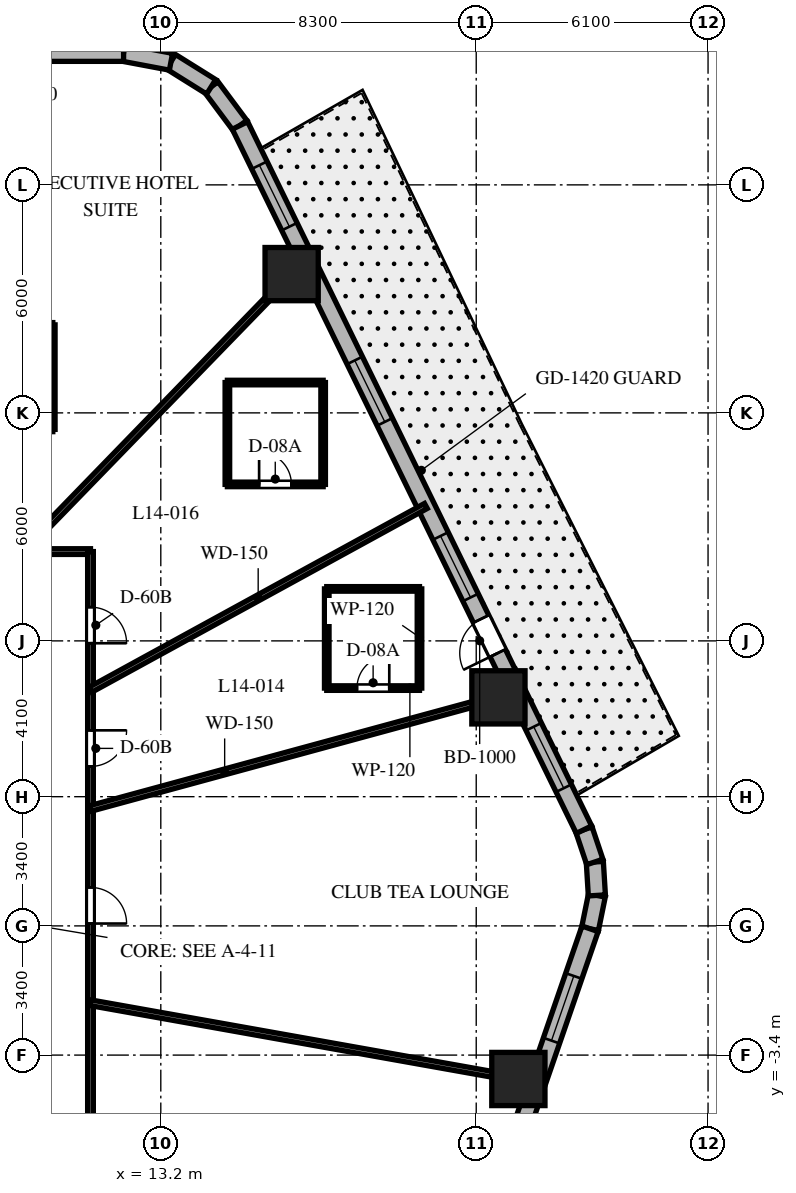
"""IFC4 building model, lengths in metres.
Left out: names, types, materials, properties, quantities, classifications, styles, units other than length and angle.
Written with IfcOpenShell. Run it as: python <this file> out.ifc"""

import sys

from ifc_helpers import new_model, si_unit, direction, frame, frame_2d, origin, origin_2d, place, context, subcontext, project, spatial, rectangle, extrude, element, fill, save


model = new_model("IFC4")
c1 = context("Model", 3, precision=1e-05, world=origin(), true_north=direction((0.0, 1.0)))
c2 = subcontext(c1, "Body", "Model", "MODEL_VIEW")
j1 = project(units=[si_unit("LENGTHUNIT", "METRE"), si_unit("PLANEANGLEUNIT", "RADIAN")], contexts=[c1])
p1 = place(None, origin())
s1 = spatial("IfcSite", under=j1, at=p1, CompositionType="ELEMENT")
p2 = place(p1, origin())
s2 = spatial("IfcBuilding", under=s1, at=p2, CompositionType="ELEMENT")
p3 = place(p2, frame((0.0, 0.0, 63.8)))
s3 = spatial("IfcBuildingStorey", under=s2, at=p3, CompositionType="ELEMENT", Elevation=63.8)
for number, where, z_axis, x_axis in (
    (1, (22.609, -4.029, 0.0), (0.0, 0.0, 1.0), (1.0, 0.0, 0.0)),
    (2, (22.084, 6.014, 0.0), (0.0, 0.0, 1.0), (1.0, 0.0, 0.0)),
    (3, (16.643, 17.152, 0.0), (0.0, 0.0, 1.0), (1.0, 0.0, 0.0)),
):
    element("IfcColumn", number, at=place(p3, frame(where, z_axis=z_axis, x_axis=x_axis)), inside=s3, PredefinedType="COLUMN", context=c2, shape_type="SweptSolid", body=[
        extrude(rectangle(XDim=1.4, YDim=1.4, at=origin_2d()), origin(), (0.0, 0.0, 1.0), 3.7),
    ])
p4 = place(p3, frame((24.496, -0.077, 0.0), z_axis=(0.0, 0.0, 1.0), x_axis=(0.199570594521, 0.979883451132, 0.0)))
e4 = element("IfcWall", 4, at=p4, inside=s3, PredefinedType="SOLIDWALL", context=c2, shape_type="SweptSolid", body=[
    extrude(rectangle(XDim=0.897, YDim=0.45, at=frame_2d((0.448, 0.0))), origin(), (0.0, 0.0, 1.0), 3.4),
])
p5 = place(p3, frame((24.675, 0.802, 0.0), z_axis=(0.0, 0.0, 1.0), x_axis=(-0.061188874166, 0.998126205286, 0.0)))
e5 = element("IfcWall", 5, at=p5, inside=s3, PredefinedType="SOLIDWALL", context=c2, shape_type="SweptSolid", body=[
    extrude(rectangle(XDim=0.882, YDim=0.45, at=frame_2d((0.441, 0.0))), origin(), (0.0, 0.0, 1.0), 3.4),
])
p6 = place(p3, frame((24.621, 1.682, 0.0), z_axis=(0.0, 0.0, 1.0), x_axis=(-0.317697451681, 0.948192137278, 0.0)))
e6 = element("IfcWall", 6, at=p6, inside=s3, PredefinedType="SOLIDWALL", context=c2, shape_type="SweptSolid", body=[
    extrude(rectangle(XDim=0.897, YDim=0.45, at=frame_2d((0.448, 0.0))), origin(), (0.0, 0.0, 1.0), 3.4),
])
p7 = place(p3, frame((15.284, 21.062, 0.0), z_axis=(0.0, 0.0, 1.0), x_axis=(-0.597595366449, 0.801797841104, 0.0)))
e7 = element("IfcWall", 7, at=p7, inside=s3, PredefinedType="SOLIDWALL", context=c2, shape_type="SweptSolid", body=[
    extrude(rectangle(XDim=1.269, YDim=0.45, at=frame_2d((0.634, 0.0))), origin(), (0.0, 0.0, 1.0), 3.4),
])
p8 = place(p3, frame((14.526, 22.08, 0.0), z_axis=(0.0, 0.0, 1.0), x_axis=(-0.848185203596, 0.529699783275, 0.0)))
e8 = element("IfcWall", 8, at=p8, inside=s3, PredefinedType="SOLIDWALL", context=c2, shape_type="SweptSolid", body=[
    extrude(rectangle(XDim=1.247, YDim=0.45, at=frame_2d((0.624, 0.0))), origin(), (0.0, 0.0, 1.0), 3.4),
])
p9 = place(p3, frame((13.468, 22.74, 0.0), z_axis=(0.0, 0.0, 1.0), x_axis=(-0.982717174228, 0.185113358451, 0.0)))
e9 = element("IfcWall", 9, at=p9, inside=s3, PredefinedType="SOLIDWALL", context=c2, shape_type="SweptSolid", body=[
    extrude(rectangle(XDim=1.269, YDim=0.45, at=frame_2d((0.634, 0.0))), origin(), (0.0, 0.0, 1.0), 3.4),
])
p10 = place(p3, frame((17.39, -20.678, 0.0), z_axis=(0.0, 0.0, 1.0), x_axis=(0.326068018294, 0.945346310854, 0.0)))
e10 = element("IfcWall", 10, at=p10, inside=s3, PredefinedType="SOLIDWALL", context=c2, shape_type="SweptSolid", body=[
    extrude(rectangle(XDim=21.793, YDim=0.45, at=frame_2d((10.896, 0.0))), origin(), (0.0, 0.0, 1.0), 3.4),
])
p11 = place(p10, frame((1.26, 0.0, 0.8)))
e11 = element("IfcOpeningElement", 11, at=p11, cuts=e10, PredefinedType="OPENING", context=c2, shape_type="SweptSolid", body=[
    extrude(rectangle(XDim=1.8, YDim=1.8, at=frame_2d((0.9, 0.9))), frame((0.0, 0.235, 0.0), z_axis=(0.0, -1.0, 0.0), x_axis=(1.0, 0.0, 0.0)), (0.0, 0.0, 1.0), 0.47),
])
p12 = place(p10, frame((9.943, 0.0, 0.8)))
e12 = element("IfcOpeningElement", 12, at=p12, cuts=e10, PredefinedType="OPENING", context=c2, shape_type="SweptSolid", body=[
    extrude(rectangle(XDim=1.8, YDim=1.8, at=frame_2d((0.9, 0.9))), frame((0.0, 0.235, 0.0), z_axis=(0.0, -1.0, 0.0), x_axis=(1.0, 0.0, 0.0)), (0.0, 0.0, 1.0), 0.47),
])
p13 = place(p10, frame((18.68, 0.0, 0.8)))
e13 = element("IfcOpeningElement", 13, at=p13, cuts=e10, PredefinedType="OPENING", context=c2, shape_type="SweptSolid", body=[
    extrude(rectangle(XDim=1.8, YDim=1.8, at=frame_2d((0.9, 0.9))), frame((0.0, 0.235, 0.0), z_axis=(0.0, -1.0, 0.0), x_axis=(1.0, 0.0, 0.0)), (0.0, 0.0, 1.0), 0.47),
])
p14 = place(p3, frame((24.336, 2.532, 0.0), z_axis=(0.0, 0.0, 1.0), x_axis=(-0.438931326393, 0.898520612291, 0.0)))
e14 = element("IfcWall", 14, at=p14, inside=s3, PredefinedType="SOLIDWALL", context=c2, shape_type="SweptSolid", body=[
    extrude(rectangle(XDim=20.623, YDim=0.45, at=frame_2d((10.312, 0.0))), origin(), (0.0, 0.0, 1.0), 3.4),
])
p15 = place(p14, frame((5.171, 0.0, 0.0)))
e15 = element("IfcOpeningElement", 15, at=p15, cuts=e14, PredefinedType="OPENING", context=c2, shape_type="SweptSolid", body=[
    extrude(rectangle(XDim=1.0, YDim=2.15, at=frame_2d((0.5, 1.075))), frame((0.0, 0.235, 0.0), z_axis=(0.0, -1.0, 0.0), x_axis=(1.0, 0.0, 0.0)), (0.0, 0.0, 1.0), 0.47),
])
p16 = place(p14, frame((6.8, 0.0, 0.8)))
e16 = element("IfcOpeningElement", 16, at=p16, cuts=e14, PredefinedType="OPENING", context=c2, shape_type="SweptSolid", body=[
    extrude(rectangle(XDim=1.8, YDim=1.8, at=frame_2d((0.9, 0.9))), frame((0.0, 0.235, 0.0), z_axis=(0.0, -1.0, 0.0), x_axis=(1.0, 0.0, 0.0)), (0.0, 0.0, 1.0), 0.47),
])
p17 = place(p14, frame((11.942, 0.0, 0.8)))
e17 = element("IfcOpeningElement", 17, at=p17, cuts=e14, PredefinedType="OPENING", context=c2, shape_type="SweptSolid", body=[
    extrude(rectangle(XDim=1.8, YDim=1.8, at=frame_2d((0.9, 0.9))), frame((0.0, 0.235, 0.0), z_axis=(0.0, -1.0, 0.0), x_axis=(1.0, 0.0, 0.0)), (0.0, 0.0, 1.0), 0.47),
])
p18 = place(p14, frame((17.66, 0.0, 0.8)))
e18 = element("IfcOpeningElement", 18, at=p18, cuts=e14, PredefinedType="OPENING", context=c2, shape_type="SweptSolid", body=[
    extrude(rectangle(XDim=1.8, YDim=1.8, at=frame_2d((0.9, 0.9))), frame((0.0, 0.235, 0.0), z_axis=(0.0, -1.0, 0.0), x_axis=(1.0, 0.0, 0.0)), (0.0, 0.0, 1.0), 0.47),
])
p19 = place(p14, frame((1.214, 0.0, 0.8)))
e19 = element("IfcOpeningElement", 19, at=p19, cuts=e14, PredefinedType="OPENING", context=c2, shape_type="SweptSolid", body=[
    extrude(rectangle(XDim=1.8, YDim=1.8, at=frame_2d((0.9, 0.9))), frame((0.0, 0.235, 0.0), z_axis=(0.0, -1.0, 0.0), x_axis=(1.0, 0.0, 0.0)), (0.0, 0.0, 1.0), 0.47),
])
p20 = place(p3, frame((12.221, 22.975, 0.0), z_axis=(0.0, 0.0, 1.0), x_axis=(-1.0, 0.0, 0.0)))
e20 = element("IfcWall", 20, at=p20, inside=s3, PredefinedType="SOLIDWALL", context=c2, shape_type="SweptSolid", body=[
    extrude(rectangle(XDim=26.389, YDim=0.45, at=frame_2d((13.195, 0.0))), origin(), (0.0, 0.0, 1.0), 3.4),
])
p21 = place(p20, frame((2.799, 0.0, 0.0)))
e21 = element("IfcOpeningElement", 21, at=p21, cuts=e20, PredefinedType="OPENING", context=c2, shape_type="SweptSolid", body=[
    extrude(rectangle(XDim=0.95, YDim=2.15, at=frame_2d((0.475, 1.075))), frame((0.0, 0.235, 0.0), z_axis=(0.0, -1.0, 0.0), x_axis=(1.0, 0.0, 0.0)), (0.0, 0.0, 1.0), 0.47),
])
p22 = place(p20, frame((12.296, 0.0, 0.8)))
e22 = element("IfcOpeningElement", 22, at=p22, cuts=e20, PredefinedType="OPENING", context=c2, shape_type="SweptSolid", body=[
    extrude(rectangle(XDim=1.8, YDim=1.8, at=frame_2d((0.9, 0.9))), frame((0.0, 0.235, 0.0), z_axis=(0.0, -1.0, 0.0), x_axis=(1.0, 0.0, 0.0)), (0.0, 0.0, 1.0), 0.47),
])
p23 = place(p20, frame((22.938, 0.0, 0.8)))
e23 = element("IfcOpeningElement", 23, at=p23, cuts=e20, PredefinedType="OPENING", context=c2, shape_type="SweptSolid", body=[
    extrude(rectangle(XDim=1.8, YDim=1.8, at=frame_2d((0.9, 0.9))), frame((0.0, 0.235, 0.0), z_axis=(0.0, -1.0, 0.0), x_axis=(1.0, 0.0, 0.0)), (0.0, 0.0, 1.0), 0.47),
])
p24 = place(p3, frame((-11.35, 9.85, 0.0), z_axis=(0.0, 0.0, 1.0), x_axis=(1.0, 0.0, 0.0)))
e24 = element("IfcWall", 24, at=p24, inside=s3, PredefinedType="PARTITIONING", context=c2, shape_type="SweptSolid", body=[
    extrude(rectangle(XDim=22.7, YDim=0.15, at=frame_2d((11.35, 0.0))), origin(), (0.0, 0.0, 1.0), 2.84),
])
p25 = place(p24, frame((17.225, 0.0, 0.0)))
e25 = element("IfcOpeningElement", 25, at=p25, cuts=e24, PredefinedType="OPENING", context=c2, shape_type="SweptSolid", body=[
    extrude(rectangle(XDim=0.95, YDim=2.03, at=frame_2d((0.475, 1.015))), frame((0.0, 0.085, 0.0), z_axis=(0.0, -1.0, 0.0), x_axis=(1.0, 0.0, 0.0)), (0.0, 0.0, 1.0), 0.17),
])
p26 = place(p24, frame((10.444, 0.0, 0.0)))
e26 = element("IfcOpeningElement", 26, at=p26, cuts=e24, PredefinedType="OPENING", context=c2, shape_type="SweptSolid", body=[
    extrude(rectangle(XDim=0.95, YDim=2.03, at=frame_2d((0.475, 1.015))), frame((0.0, 0.085, 0.0), z_axis=(0.0, -1.0, 0.0), x_axis=(1.0, 0.0, 0.0)), (0.0, 0.0, 1.0), 0.17),
])
p27 = place(p24, frame((3.369, 0.0, 0.0)))
e27 = element("IfcOpeningElement", 27, at=p27, cuts=e24, PredefinedType="OPENING", context=c2, shape_type="SweptSolid", body=[
    extrude(rectangle(XDim=0.95, YDim=2.03, at=frame_2d((0.475, 1.015))), frame((0.0, 0.085, 0.0), z_axis=(0.0, -1.0, 0.0), x_axis=(1.0, 0.0, 0.0)), (0.0, 0.0, 1.0), 0.17),
])
p28 = place(p3, frame((11.35, 9.85, 0.0), z_axis=(0.0, 0.0, 1.0), x_axis=(0.0, -1.0, 0.0)))
e28 = element("IfcWall", 28, at=p28, inside=s3, PredefinedType="PARTITIONING", context=c2, shape_type="SweptSolid", body=[
    extrude(rectangle(XDim=19.7, YDim=0.15, at=frame_2d((9.85, 0.0))), origin(), (0.0, 0.0, 1.0), 2.84),
])
p29 = place(p28, frame((4.704, 0.0, 0.0)))
e29 = element("IfcOpeningElement", 29, at=p29, cuts=e28, PredefinedType="OPENING", context=c2, shape_type="SweptSolid", body=[
    extrude(rectangle(XDim=0.95, YDim=2.03, at=frame_2d((0.475, 1.015))), frame((0.0, 0.085, 0.0), z_axis=(0.0, -1.0, 0.0), x_axis=(1.0, 0.0, 0.0)), (0.0, 0.0, 1.0), 0.17),
])
p30 = place(p28, frame((1.462, 0.0, 0.0)))
e30 = element("IfcOpeningElement", 30, at=p30, cuts=e28, PredefinedType="OPENING", context=c2, shape_type="SweptSolid", body=[
    extrude(rectangle(XDim=0.95, YDim=2.03, at=frame_2d((0.475, 1.015))), frame((0.0, 0.085, 0.0), z_axis=(0.0, -1.0, 0.0), x_axis=(1.0, 0.0, 0.0)), (0.0, 0.0, 1.0), 0.17),
])
p31 = place(p28, frame((15.191, 0.0, 0.0)))
e31 = element("IfcOpeningElement", 31, at=p31, cuts=e28, PredefinedType="OPENING", context=c2, shape_type="SweptSolid", body=[
    extrude(rectangle(XDim=0.95, YDim=2.03, at=frame_2d((0.475, 1.015))), frame((0.0, 0.085, 0.0), z_axis=(0.0, -1.0, 0.0), x_axis=(1.0, 0.0, 0.0)), (0.0, 0.0, 1.0), 0.17),
])
p32 = place(p28, frame((8.838, 0.0, 0.0)))
e32 = element("IfcOpeningElement", 32, at=p32, cuts=e28, PredefinedType="OPENING", context=c2, shape_type="SweptSolid", body=[
    extrude(rectangle(XDim=0.95, YDim=2.03, at=frame_2d((0.475, 1.015))), frame((0.0, 0.085, 0.0), z_axis=(0.0, -1.0, 0.0), x_axis=(1.0, 0.0, 0.0)), (0.0, 0.0, 1.0), 0.17),
])
p33 = place(p3, frame((11.35, 3.091, 0.0), z_axis=(0.0, 0.0, 1.0), x_axis=(0.964859685283, 0.262765651704, 0.0)))
e33 = element("IfcWall", 33, at=p33, inside=s3, PredefinedType="PARTITIONING", context=c2, shape_type="SweptSolid", body=[
    extrude(rectangle(XDim=11.629, YDim=0.15, at=frame_2d((5.814, 0.0))), origin(), (0.0, 0.0, 1.0), 2.54),
])
p34 = place(p3, frame((11.35, 6.217, 0.0), z_axis=(0.0, 0.0, 1.0), x_axis=(0.877047587135, 0.480403507378, 0.0)))
e34 = element("IfcWall", 34, at=p34, inside=s3, PredefinedType="PARTITIONING", context=c2, shape_type="SweptSolid", body=[
    extrude(rectangle(XDim=10.062, YDim=0.15, at=frame_2d((5.031, 0.0))), origin(), (0.0, 0.0, 1.0), 2.54),
])
p35 = place(p3, frame((9.558, 9.85, 0.0), z_axis=(0.0, 0.0, 1.0), x_axis=(0.69638346089, 0.717669893056, 0.0)))
e35 = element("IfcWall", 35, at=p35, inside=s3, PredefinedType="PARTITIONING", context=c2, shape_type="SweptSolid", body=[
    extrude(rectangle(XDim=10.701, YDim=0.15, at=frame_2d((5.351, 0.0))), origin(), (0.0, 0.0, 1.0), 2.54),
])
p36 = place(p3, frame((11.35, -2.023, 0.0), z_axis=(0.0, 0.0, 1.0), x_axis=(0.984493741877, -0.17541970301, 0.0)))
e36 = element("IfcWall", 36, at=p36, inside=s3, PredefinedType="PARTITIONING", context=c2, shape_type="SweptSolid", body=[
    extrude(rectangle(XDim=11.937, YDim=0.15, at=frame_2d((5.969, 0.0))), origin(), (0.0, 0.0, 1.0), 2.54),
])
p37 = place(p3, frame((17.567, 6.258, 0.0), z_axis=(0.0, 0.0, 1.0), x_axis=(1.0, 0.0, 0.0)))
e37 = element("IfcWall", 37, at=p37, inside=s3, PredefinedType="PARTITIONING", context=c2, shape_type="SweptSolid", body=[
    extrude(rectangle(XDim=2.44, YDim=0.12, at=frame_2d((1.22, 0.0))), origin(), (0.0, 0.0, 1.0), 2.84),
])
p38 = place(p37, frame((0.795, 0.0, 0.0)))
e38 = element("IfcOpeningElement", 38, at=p38, cuts=e37, PredefinedType="OPENING", context=c2, shape_type="SweptSolid", body=[
    extrude(rectangle(XDim=0.85, YDim=2.03, at=frame_2d((0.425, 1.015))), frame((0.0, 0.07, 0.0), z_axis=(0.0, -1.0, 0.0), x_axis=(1.0, 0.0, 0.0)), (0.0, 0.0, 1.0), 0.14),
])
p39 = place(p3, frame((20.007, 6.258, 0.0), z_axis=(0.0, 0.0, 1.0), x_axis=(0.0, 1.0, 0.0)))
e39 = element("IfcWall", 39, at=p39, inside=s3, PredefinedType="PARTITIONING", context=c2, shape_type="SweptSolid", body=[
    extrude(rectangle(XDim=2.61, YDim=0.12, at=frame_2d((1.305, 0.0))), origin(), (0.0, 0.0, 1.0), 2.84),
])
p40 = place(p3, frame((20.007, 8.868, 0.0), z_axis=(0.0, 0.0, 1.0), x_axis=(-1.0, 0.0, 0.0)))
e40 = element("IfcWall", 40, at=p40, inside=s3, PredefinedType="PARTITIONING", context=c2, shape_type="SweptSolid", body=[
    extrude(rectangle(XDim=2.44, YDim=0.12, at=frame_2d((1.22, 0.0))), origin(), (0.0, 0.0, 1.0), 3.4),
])
p41 = place(p3, frame((17.567, 8.868, 0.0), z_axis=(0.0, 0.0, 1.0), x_axis=(0.0, -1.0, 0.0)))
e41 = element("IfcWall", 41, at=p41, inside=s3, PredefinedType="PARTITIONING", context=c2, shape_type="SweptSolid", body=[
    extrude(rectangle(XDim=2.61, YDim=0.12, at=frame_2d((1.305, 0.0))), origin(), (0.0, 0.0, 1.0), 2.84),
])
p42 = place(p3, frame((14.952, 11.618, 0.0), z_axis=(0.0, 0.0, 1.0), x_axis=(1.0, 0.0, 0.0)))
e42 = element("IfcWall", 42, at=p42, inside=s3, PredefinedType="PARTITIONING", context=c2, shape_type="SweptSolid", body=[
    extrude(rectangle(XDim=2.52, YDim=0.12, at=frame_2d((1.26, 0.0))), origin(), (0.0, 0.0, 1.0), 2.927),
])
p43 = place(p42, frame((0.835, 0.0, 0.0)))
e43 = element("IfcOpeningElement", 43, at=p43, cuts=e42, PredefinedType="OPENING", context=c2, shape_type="SweptSolid", body=[
    extrude(rectangle(XDim=0.85, YDim=2.03, at=frame_2d((0.425, 1.015))), frame((0.0, 0.07, 0.0), z_axis=(0.0, -1.0, 0.0), x_axis=(1.0, 0.0, 0.0)), (0.0, 0.0, 1.0), 0.14),
])
p44 = place(p3, frame((17.472, 11.618, 0.0), z_axis=(0.0, 0.0, 1.0), x_axis=(0.0, 1.0, 0.0)))
e44 = element("IfcWall", 44, at=p44, inside=s3, PredefinedType="PARTITIONING", context=c2, shape_type="SweptSolid", body=[
    extrude(rectangle(XDim=2.68, YDim=0.12, at=frame_2d((1.34, 0.0))), origin(), (0.0, 0.0, 1.0), 3.4),
])
p45 = place(p3, frame((17.472, 14.298, 0.0), z_axis=(0.0, 0.0, 1.0), x_axis=(-1.0, 0.0, 0.0)))
e45 = element("IfcWall", 45, at=p45, inside=s3, PredefinedType="PARTITIONING", context=c2, shape_type="SweptSolid", body=[
    extrude(rectangle(XDim=2.52, YDim=0.12, at=frame_2d((1.26, 0.0))), origin(), (0.0, 0.0, 1.0), 3.4),
])
p46 = place(p3, frame((14.952, 14.298, 0.0), z_axis=(0.0, 0.0, 1.0), x_axis=(0.0, -1.0, 0.0)))
e46 = element("IfcWall", 46, at=p46, inside=s3, PredefinedType="PARTITIONING", context=c2, shape_type="SweptSolid", body=[
    extrude(rectangle(XDim=2.68, YDim=0.12, at=frame_2d((1.34, 0.0))), origin(), (0.0, 0.0, 1.0), 2.927),
])
p47 = place(p3, frame((7.758, 13.066, 0.0), z_axis=(0.0, 0.0, 1.0), x_axis=(1.0, 0.0, 0.0)))
e47 = element("IfcWall", 47, at=p47, inside=s3, PredefinedType="PARTITIONING", context=c2, shape_type="SweptSolid", body=[
    extrude(rectangle(XDim=2.6, YDim=0.12, at=frame_2d((1.3, 0.0))), origin(), (0.0, 0.0, 1.0), 2.84),
])
p48 = place(p47, frame((0.875, 0.0, 0.0)))
e48 = element("IfcOpeningElement", 48, at=p48, cuts=e47, PredefinedType="OPENING", context=c2, shape_type="SweptSolid", body=[
    extrude(rectangle(XDim=0.85, YDim=2.03, at=frame_2d((0.425, 1.015))), frame((0.0, 0.07, 0.0), z_axis=(0.0, -1.0, 0.0), x_axis=(1.0, 0.0, 0.0)), (0.0, 0.0, 1.0), 0.14),
])
p49 = place(p3, frame((10.358, 13.066, 0.0), z_axis=(0.0, 0.0, 1.0), x_axis=(0.0, 1.0, 0.0)))
e49 = element("IfcWall", 49, at=p49, inside=s3, PredefinedType="PARTITIONING", context=c2, shape_type="SweptSolid", body=[
    extrude(rectangle(XDim=2.75, YDim=0.12, at=frame_2d((1.375, 0.0))), origin(), (0.0, 0.0, 1.0), 3.4),
])
p50 = place(p3, frame((10.358, 15.816, 0.0), z_axis=(0.0, 0.0, 1.0), x_axis=(-1.0, 0.0, 0.0)))
e50 = element("IfcWall", 50, at=p50, inside=s3, PredefinedType="PARTITIONING", context=c2, shape_type="SweptSolid", body=[
    extrude(rectangle(XDim=2.6, YDim=0.12, at=frame_2d((1.3, 0.0))), origin(), (0.0, 0.0, 1.0), 2.84),
])
p51 = place(p13, origin())
e51 = element("IfcWindow", 51, at=p51, inside=s3, PartitioningType="SINGLE_PANEL", PredefinedType="WINDOW", context=c2, shape_type="SweptSolid", body=[
    extrude(rectangle(XDim=1.8, YDim=1.8, at=frame_2d((0.9, 0.9))), frame((0.0, 0.03, 0.0), z_axis=(0.0, -1.0, 0.0), x_axis=(1.0, 0.0, 0.0)), (0.0, 0.0, 1.0), 0.06),
])
fill(e13, e51)
p52 = place(p15, origin())
e52 = element("IfcDoor", 52, at=p52, inside=s3, OperationType="SINGLE_SWING_LEFT", PredefinedType="DOOR", context=c2, shape_type="SweptSolid", body=[
    extrude(rectangle(XDim=1.0, YDim=2.15, at=frame_2d((0.5, 1.075))), frame((0.0, 0.025, 0.0), z_axis=(0.0, -1.0, 0.0), x_axis=(1.0, 0.0, 0.0)), (0.0, 0.0, 1.0), 0.05),
])
fill(e15, e52)
p53 = place(p16, origin())
e53 = element("IfcWindow", 53, at=p53, inside=s3, PartitioningType="SINGLE_PANEL", PredefinedType="WINDOW", context=c2, shape_type="SweptSolid", body=[
    extrude(rectangle(XDim=1.8, YDim=1.8, at=frame_2d((0.9, 0.9))), frame((0.0, 0.03, 0.0), z_axis=(0.0, -1.0, 0.0), x_axis=(1.0, 0.0, 0.0)), (0.0, 0.0, 1.0), 0.06),
])
fill(e16, e53)
p54 = place(p17, origin())
e54 = element("IfcWindow", 54, at=p54, inside=s3, PartitioningType="SINGLE_PANEL", PredefinedType="WINDOW", context=c2, shape_type="SweptSolid", body=[
    extrude(rectangle(XDim=1.8, YDim=1.8, at=frame_2d((0.9, 0.9))), frame((0.0, 0.03, 0.0), z_axis=(0.0, -1.0, 0.0), x_axis=(1.0, 0.0, 0.0)), (0.0, 0.0, 1.0), 0.06),
])
fill(e17, e54)
p55 = place(p18, origin())
e55 = element("IfcWindow", 55, at=p55, inside=s3, PartitioningType="SINGLE_PANEL", PredefinedType="WINDOW", context=c2, shape_type="SweptSolid", body=[
    extrude(rectangle(XDim=1.8, YDim=1.8, at=frame_2d((0.9, 0.9))), frame((0.0, 0.03, 0.0), z_axis=(0.0, -1.0, 0.0), x_axis=(1.0, 0.0, 0.0)), (0.0, 0.0, 1.0), 0.06),
])
fill(e18, e55)
p56 = place(p19, origin())
e56 = element("IfcWindow", 56, at=p56, inside=s3, PartitioningType="SINGLE_PANEL", PredefinedType="WINDOW", context=c2, shape_type="SweptSolid", body=[
    extrude(rectangle(XDim=1.8, YDim=1.8, at=frame_2d((0.9, 0.9))), frame((0.0, 0.03, 0.0), z_axis=(0.0, -1.0, 0.0), x_axis=(1.0, 0.0, 0.0)), (0.0, 0.0, 1.0), 0.06),
])
fill(e19, e56)
p57 = place(p29, origin())
e57 = element("IfcDoor", 57, at=p57, inside=s3, OperationType="SINGLE_SWING_LEFT", PredefinedType="DOOR", context=c2, shape_type="SweptSolid", body=[
    extrude(rectangle(XDim=0.95, YDim=2.03, at=frame_2d((0.475, 1.015))), frame((0.0, 0.025, 0.0), z_axis=(0.0, -1.0, 0.0), x_axis=(1.0, 0.0, 0.0)), (0.0, 0.0, 1.0), 0.05),
])
fill(e29, e57)
p58 = place(p38, origin())
e58 = element("IfcDoor", 58, at=p58, inside=s3, OperationType="SINGLE_SWING_RIGHT", PredefinedType="DOOR", context=c2, shape_type="SweptSolid", body=[
    extrude(rectangle(XDim=0.85, YDim=2.03, at=frame_2d((0.425, 1.015))), frame((0.0, 0.025, 0.0), z_axis=(0.0, -1.0, 0.0), x_axis=(1.0, 0.0, 0.0)), (0.0, 0.0, 1.0), 0.05),
])
fill(e38, e58)
p59 = place(p30, origin())
e59 = element("IfcDoor", 59, at=p59, inside=s3, OperationType="SINGLE_SWING_RIGHT", PredefinedType="DOOR", context=c2, shape_type="SweptSolid", body=[
    extrude(rectangle(XDim=0.95, YDim=2.03, at=frame_2d((0.475, 1.015))), frame((0.0, 0.025, 0.0), z_axis=(0.0, -1.0, 0.0), x_axis=(1.0, 0.0, 0.0)), (0.0, 0.0, 1.0), 0.05),
])
fill(e30, e59)
p60 = place(p43, origin())
e60 = element("IfcDoor", 60, at=p60, inside=s3, OperationType="SINGLE_SWING_LEFT", PredefinedType="DOOR", context=c2, shape_type="SweptSolid", body=[
    extrude(rectangle(XDim=0.85, YDim=2.03, at=frame_2d((0.425, 1.015))), frame((0.0, 0.025, 0.0), z_axis=(0.0, -1.0, 0.0), x_axis=(1.0, 0.0, 0.0)), (0.0, 0.0, 1.0), 0.05),
])
fill(e43, e60)
p61 = place(p32, origin())
e61 = element("IfcDoor", 61, at=p61, inside=s3, OperationType="SINGLE_SWING_RIGHT", PredefinedType="DOOR", context=c2, shape_type="SweptSolid", body=[
    extrude(rectangle(XDim=0.95, YDim=2.03, at=frame_2d((0.475, 1.015))), frame((0.0, 0.025, 0.0), z_axis=(0.0, -1.0, 0.0), x_axis=(1.0, 0.0, 0.0)), (0.0, 0.0, 1.0), 0.05),
])
fill(e32, e61)
save(model, sys.argv[1])
